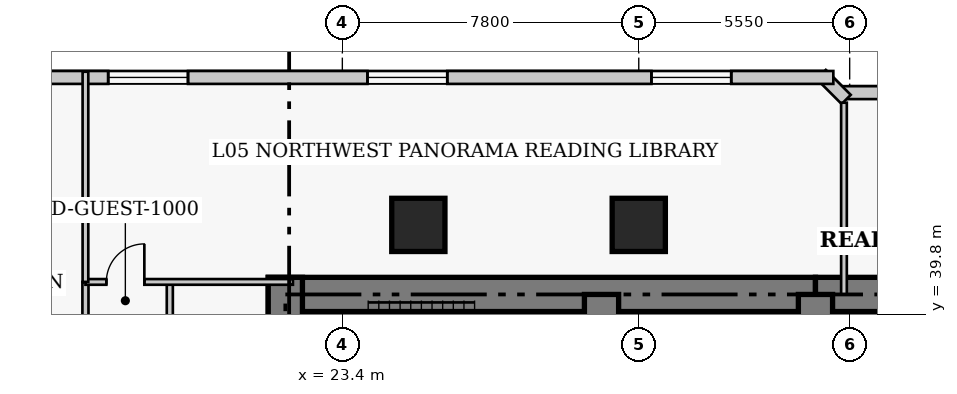
"""IFC4 building model, lengths in metres.
Left out: names, types, materials, properties, quantities, classifications, styles, units other than length and angle.
Written with IfcOpenShell. Run it as: python <this file> out.ifc"""

import sys

from ifc_helpers import new_model, si_unit, direction, frame, frame_2d, origin, origin_2d, place, context, subcontext, project, spatial, rectangle, extrude, element, fill, save


model = new_model("IFC4")
c1 = context("Model", 3, precision=1e-05, world=origin(), true_north=direction((0.0, 1.0)))
c2 = subcontext(c1, "Body", "Model", "MODEL_VIEW")
j1 = project(units=[si_unit("LENGTHUNIT", "METRE"), si_unit("PLANEANGLEUNIT", "RADIAN")], contexts=[c1])
p1 = place(None, origin())
s1 = spatial("IfcSite", under=j1, at=p1, CompositionType="ELEMENT")
p2 = place(p1, origin())
s2 = spatial("IfcBuilding", under=s1, at=p2, CompositionType="ELEMENT")
p3 = place(p2, frame((0.0, 0.0, 26.0)))
s3 = spatial("IfcBuildingStorey", under=s2, at=p3, CompositionType="ELEMENT", Elevation=26.0)
p4 = place(p3, frame((21.45, 40.32, 0.0), z_axis=(0.0, 0.0, 1.0), x_axis=(1.0, 0.0, 0.0)))
e1 = element("IfcWall", 1, at=p4, inside=s3, PredefinedType="SHEAR", context=c2, shape_type="SweptSolid", body=[
    extrude(rectangle(XDim=14.4, YDim=0.9, at=frame_2d((7.2, 0.0))), origin(), (0.0, 0.0, 1.0), 3.8),
])
p5 = place(p3, frame((35.85, 40.32, 0.0), z_axis=(0.0, 0.0, 1.0), x_axis=(1.0, 0.0, 0.0)))
e2 = element("IfcWall", 2, at=p5, inside=s3, PredefinedType="SHEAR", context=c2, shape_type="SweptSolid", body=[
    extrude(rectangle(XDim=12.6, YDim=0.9, at=frame_2d((6.3, 0.0))), origin(), (0.0, 0.0, 1.0), 3.8),
])
p6 = place(p3, frame((21.9, 27.05, 0.0), z_axis=(0.0, 0.0, 1.0), x_axis=(0.0, 1.0, 0.0)))
e3 = element("IfcWall", 3, at=p6, inside=s3, PredefinedType="SHEAR", context=c2, shape_type="SweptSolid", body=[
    extrude(rectangle(XDim=13.72, YDim=0.9, at=frame_2d((6.86, 0.0))), origin(), (0.0, 0.0, 1.0), 3.8),
])
p7 = place(p3, frame((30.22, 33.2, 0.0), z_axis=(0.0, 0.0, 1.0), x_axis=(0.0, 1.0, 0.0)))
e4 = element("IfcWall", 4, at=p7, inside=s3, PredefinedType="SHEAR", context=c2, shape_type="SweptSolid", body=[
    extrude(rectangle(XDim=7.12, YDim=0.9, at=frame_2d((3.56, 0.0))), origin(), (0.0, 0.0, 1.0), 3.8),
])
p8 = place(p3, frame((35.85, 36.37, 0.0), z_axis=(0.0, 0.0, 1.0), x_axis=(0.0, 1.0, 0.0)))
e5 = element("IfcWall", 5, at=p8, inside=s3, PredefinedType="SHEAR", context=c2, shape_type="SweptSolid", body=[
    extrude(rectangle(XDim=3.95, YDim=0.9, at=frame_2d((1.975, 0.0))), origin(), (0.0, 0.0, 1.0), 3.8),
])
p9 = place(p8, frame((0.88, 0.0, 0.0)))
e6 = element("IfcOpeningElement", 6, at=p9, cuts=e5, PredefinedType="OPENING", context=c2, shape_type="SweptSolid", body=[
    extrude(rectangle(XDim=1.1, YDim=2.15, at=frame_2d((0.55, 1.075))), frame((0.0, 0.46, 0.0), z_axis=(0.0, -1.0, 0.0), x_axis=(1.0, 0.0, 0.0)), (0.0, 0.0, 1.0), 0.92),
])
for number, where, z_axis, x_axis in (
    (7, (25.4, 42.15, 0.0), (0.0, 0.0, 1.0), (1.0, 0.0, 0.0)),
    (8, (31.2, 42.15, 0.0), (0.0, 0.0, 1.0), (1.0, 0.0, 0.0)),
):
    element("IfcColumn", number, at=place(p3, frame(where, z_axis=z_axis, x_axis=x_axis)), inside=s3, PredefinedType="COLUMN", context=c2, shape_type="SweptSolid", body=[
        extrude(rectangle(XDim=1.4, YDim=1.4, at=origin_2d()), origin(), (0.0, 0.0, 1.0), 3.8),
    ])
p10 = place(p3, frame((41.42, 45.63, 0.0), z_axis=(0.0, 0.0, 1.0), x_axis=(-1.0, 0.0, 0.0)))
e9 = element("IfcWall", 9, at=p10, inside=s3, PredefinedType="SOLIDWALL", context=c2, shape_type="SweptSolid", body=[
    extrude(rectangle(XDim=4.84, YDim=0.34, at=frame_2d((2.42, 0.0))), origin(), (0.0, 0.0, 1.0), 3.54),
])
p11 = place(p10, frame((1.37, 0.0, 0.85)))
e10 = element("IfcOpeningElement", 10, at=p11, cuts=e9, PredefinedType="OPENING", context=c2, shape_type="SweptSolid", body=[
    extrude(rectangle(XDim=2.1, YDim=1.85, at=frame_2d((1.05, 0.925))), frame((0.0, 0.18, 0.0), z_axis=(0.0, -1.0, 0.0), x_axis=(1.0, 0.0, 0.0)), (0.0, 0.0, 1.0), 0.36),
])
p12 = place(p3, frame((36.658, 45.451, 0.0), z_axis=(0.0, 0.0, 1.0), x_axis=(-0.707106781187, 0.707106781187, 0.0)))
e11 = element("IfcWall", 11, at=p12, inside=s3, PredefinedType="SOLIDWALL", context=c2, shape_type="SweptSolid", body=[
    extrude(rectangle(XDim=0.929, YDim=0.34, at=frame_2d((0.464, 0.0))), origin(), (0.0, 0.0, 1.0), 3.54),
])
p13 = place(p3, frame((36.32, 46.03, 0.0), z_axis=(0.0, 0.0, 1.0), x_axis=(-1.0, 0.0, 0.0)))
e12 = element("IfcWall", 12, at=p13, inside=s3, PredefinedType="SOLIDWALL", context=c2, shape_type="SweptSolid", body=[
    extrude(rectangle(XDim=29.89, YDim=0.34, at=frame_2d((14.945, 0.0))), origin(), (0.0, 0.0, 1.0), 3.54),
])
p14 = place(p13, frame((2.686, 0.0, 0.85)))
e13 = element("IfcOpeningElement", 13, at=p14, cuts=e12, PredefinedType="OPENING", context=c2, shape_type="SweptSolid", body=[
    extrude(rectangle(XDim=2.1, YDim=1.85, at=frame_2d((1.05, 0.925))), frame((0.0, 0.18, 0.0), z_axis=(0.0, -1.0, 0.0), x_axis=(1.0, 0.0, 0.0)), (0.0, 0.0, 1.0), 0.36),
])
p15 = place(p13, frame((10.159, 0.0, 0.85)))
e14 = element("IfcOpeningElement", 14, at=p15, cuts=e12, PredefinedType="OPENING", context=c2, shape_type="SweptSolid", body=[
    extrude(rectangle(XDim=2.1, YDim=1.85, at=frame_2d((1.05, 0.925))), frame((0.0, 0.18, 0.0), z_axis=(0.0, -1.0, 0.0), x_axis=(1.0, 0.0, 0.0)), (0.0, 0.0, 1.0), 0.36),
])
p16 = place(p13, frame((16.981, 0.0, 0.85)))
e15 = element("IfcOpeningElement", 15, at=p16, cuts=e12, PredefinedType="OPENING", context=c2, shape_type="SweptSolid", body=[
    extrude(rectangle(XDim=2.1, YDim=1.85, at=frame_2d((1.05, 0.925))), frame((0.0, 0.18, 0.0), z_axis=(0.0, -1.0, 0.0), x_axis=(1.0, 0.0, 0.0)), (0.0, 0.0, 1.0), 0.36),
])
p17 = place(p13, frame((25.104, 0.0, 0.85)))
e16 = element("IfcOpeningElement", 16, at=p17, cuts=e12, PredefinedType="OPENING", context=c2, shape_type="SweptSolid", body=[
    extrude(rectangle(XDim=2.1, YDim=1.85, at=frame_2d((1.05, 0.925))), frame((0.0, 0.18, 0.0), z_axis=(0.0, -1.0, 0.0), x_axis=(1.0, 0.0, 0.0)), (0.0, 0.0, 1.0), 0.36),
])
p18 = place(p3, frame((16.64, 5.05, 0.0), z_axis=(0.0, 0.0, 1.0), x_axis=(0.0, 1.0, 0.0)))
e17 = element("IfcWall", 17, at=p18, inside=s3, PredefinedType="PARTITIONING", context=c2, shape_type="SweptSolid", body=[
    extrude(rectangle(XDim=35.6, YDim=0.16, at=frame_2d((17.8, 0.0))), origin(), (0.0, 0.0, 1.0), 3.54),
])
p19 = place(p18, frame((2.6, 0.0, 0.0)))
e18 = element("IfcOpeningElement", 18, at=p19, cuts=e17, PredefinedType="OPENING", context=c2, shape_type="SweptSolid", body=[
    extrude(rectangle(XDim=0.95, YDim=2.1, at=frame_2d((0.475, 1.05))), frame((0.0, 0.09, 0.0), z_axis=(0.0, -1.0, 0.0), x_axis=(1.0, 0.0, 0.0)), (0.0, 0.0, 1.0), 0.18),
])
p20 = place(p18, frame((10.075, 0.0, 0.0)))
e19 = element("IfcOpeningElement", 19, at=p20, cuts=e17, PredefinedType="OPENING", context=c2, shape_type="SweptSolid", body=[
    extrude(rectangle(XDim=0.95, YDim=2.1, at=frame_2d((0.475, 1.05))), frame((0.0, 0.09, 0.0), z_axis=(0.0, -1.0, 0.0), x_axis=(1.0, 0.0, 0.0)), (0.0, 0.0, 1.0), 0.18),
])
p21 = place(p18, frame((18.875, 0.0, 0.0)))
e20 = element("IfcOpeningElement", 20, at=p21, cuts=e17, PredefinedType="OPENING", context=c2, shape_type="SweptSolid", body=[
    extrude(rectangle(XDim=0.95, YDim=2.1, at=frame_2d((0.475, 1.05))), frame((0.0, 0.09, 0.0), z_axis=(0.0, -1.0, 0.0), x_axis=(1.0, 0.0, 0.0)), (0.0, 0.0, 1.0), 0.18),
])
p22 = place(p18, frame((26.575, 0.0, 0.0)))
e21 = element("IfcOpeningElement", 21, at=p22, cuts=e17, PredefinedType="OPENING", context=c2, shape_type="SweptSolid", body=[
    extrude(rectangle(XDim=0.95, YDim=2.1, at=frame_2d((0.475, 1.05))), frame((0.0, 0.09, 0.0), z_axis=(0.0, -1.0, 0.0), x_axis=(1.0, 0.0, 0.0)), (0.0, 0.0, 1.0), 0.18),
])
p23 = place(p18, frame((30.9, 0.0, 0.0)))
e22 = element("IfcOpeningElement", 22, at=p23, cuts=e17, PredefinedType="OPENING", context=c2, shape_type="SweptSolid", body=[
    extrude(rectangle(XDim=1.0, YDim=2.15, at=frame_2d((0.5, 1.075))), frame((0.0, 0.09, 0.0), z_axis=(0.0, -1.0, 0.0), x_axis=(1.0, 0.0, 0.0)), (0.0, 0.0, 1.0), 0.18),
])
p24 = place(p3, frame((18.86, 35.02, 0.0), z_axis=(0.0, 0.0, 1.0), x_axis=(0.0, 1.0, 0.0)))
e23 = element("IfcWall", 23, at=p24, inside=s3, PredefinedType="PARTITIONING", context=c2, shape_type="SweptSolid", body=[
    extrude(rectangle(XDim=5.63, YDim=0.16, at=frame_2d((2.815, 0.0))), origin(), (0.0, 0.0, 1.0), 3.54),
])
p25 = place(p3, frame((16.64, 40.65, 0.0), z_axis=(0.0, 0.0, 1.0), x_axis=(1.0, 0.0, 0.0)))
e24 = element("IfcWall", 24, at=p25, inside=s3, PredefinedType="PARTITIONING", context=c2, shape_type="SweptSolid", body=[
    extrude(rectangle(XDim=5.46, YDim=0.15, at=frame_2d((2.73, 0.0))), origin(), (0.0, 0.0, 1.0), 3.54),
])
p26 = place(p25, frame((0.55, 0.0, 0.0)))
e25 = element("IfcOpeningElement", 25, at=p26, cuts=e24, PredefinedType="OPENING", context=c2, shape_type="SweptSolid", body=[
    extrude(rectangle(XDim=1.0, YDim=2.15, at=frame_2d((0.5, 1.075))), frame((0.0, 0.085, 0.0), z_axis=(0.0, -1.0, 0.0), x_axis=(1.0, 0.0, 0.0)), (0.0, 0.0, 1.0), 0.17),
])
p27 = place(p3, frame((16.64, 40.65, 0.0), z_axis=(0.0, 0.0, 1.0), x_axis=(0.0, 1.0, 0.0)))
e26 = element("IfcWall", 26, at=p27, inside=s3, PredefinedType="PARTITIONING", context=c2, shape_type="SweptSolid", body=[
    extrude(rectangle(XDim=5.53, YDim=0.15, at=frame_2d((2.765, 0.0))), origin(), (0.0, 0.0, 1.0), 3.54),
])
p28 = place(p3, frame((36.6, 40.32, 0.0), z_axis=(0.0, 0.0, 1.0), x_axis=(0.0, 1.0, 0.0)))
e27 = element("IfcWall", 27, at=p28, inside=s3, PredefinedType="PARTITIONING", context=c2, shape_type="SweptSolid", body=[
    extrude(rectangle(XDim=5.045, YDim=0.15, at=frame_2d((2.522, 0.0))), origin(), (0.0, 0.0, 1.0), 3.54),
])
p29 = place(p14, origin())
e28 = element("IfcWindow", 28, at=p29, inside=s3, PartitioningType="SINGLE_PANEL", PredefinedType="WINDOW", context=c2, shape_type="SweptSolid", body=[
    extrude(rectangle(XDim=2.1, YDim=1.85, at=frame_2d((1.05, 0.925))), frame((0.0, 0.03, 0.0), z_axis=(0.0, -1.0, 0.0), x_axis=(1.0, 0.0, 0.0)), (0.0, 0.0, 1.0), 0.06),
])
fill(e13, e28)
p30 = place(p15, origin())
e29 = element("IfcWindow", 29, at=p30, inside=s3, PartitioningType="SINGLE_PANEL", PredefinedType="WINDOW", context=c2, shape_type="SweptSolid", body=[
    extrude(rectangle(XDim=2.1, YDim=1.85, at=frame_2d((1.05, 0.925))), frame((0.0, 0.03, 0.0), z_axis=(0.0, -1.0, 0.0), x_axis=(1.0, 0.0, 0.0)), (0.0, 0.0, 1.0), 0.06),
])
fill(e14, e29)
p31 = place(p16, origin())
e30 = element("IfcWindow", 30, at=p31, inside=s3, PartitioningType="SINGLE_PANEL", PredefinedType="WINDOW", context=c2, shape_type="SweptSolid", body=[
    extrude(rectangle(XDim=2.1, YDim=1.85, at=frame_2d((1.05, 0.925))), frame((0.0, 0.03, 0.0), z_axis=(0.0, -1.0, 0.0), x_axis=(1.0, 0.0, 0.0)), (0.0, 0.0, 1.0), 0.06),
])
fill(e15, e30)
p32 = place(p26, origin())
e31 = element("IfcDoor", 31, at=p32, inside=s3, OperationType="SINGLE_SWING_RIGHT", PredefinedType="DOOR", context=c2, shape_type="SweptSolid", body=[
    extrude(rectangle(XDim=1.0, YDim=2.15, at=frame_2d((0.5, 1.075))), frame((0.0, 0.025, 0.0), z_axis=(0.0, -1.0, 0.0), x_axis=(1.0, 0.0, 0.0)), (0.0, 0.0, 1.0), 0.05),
])
fill(e25, e31)
save(model, sys.argv[1])
